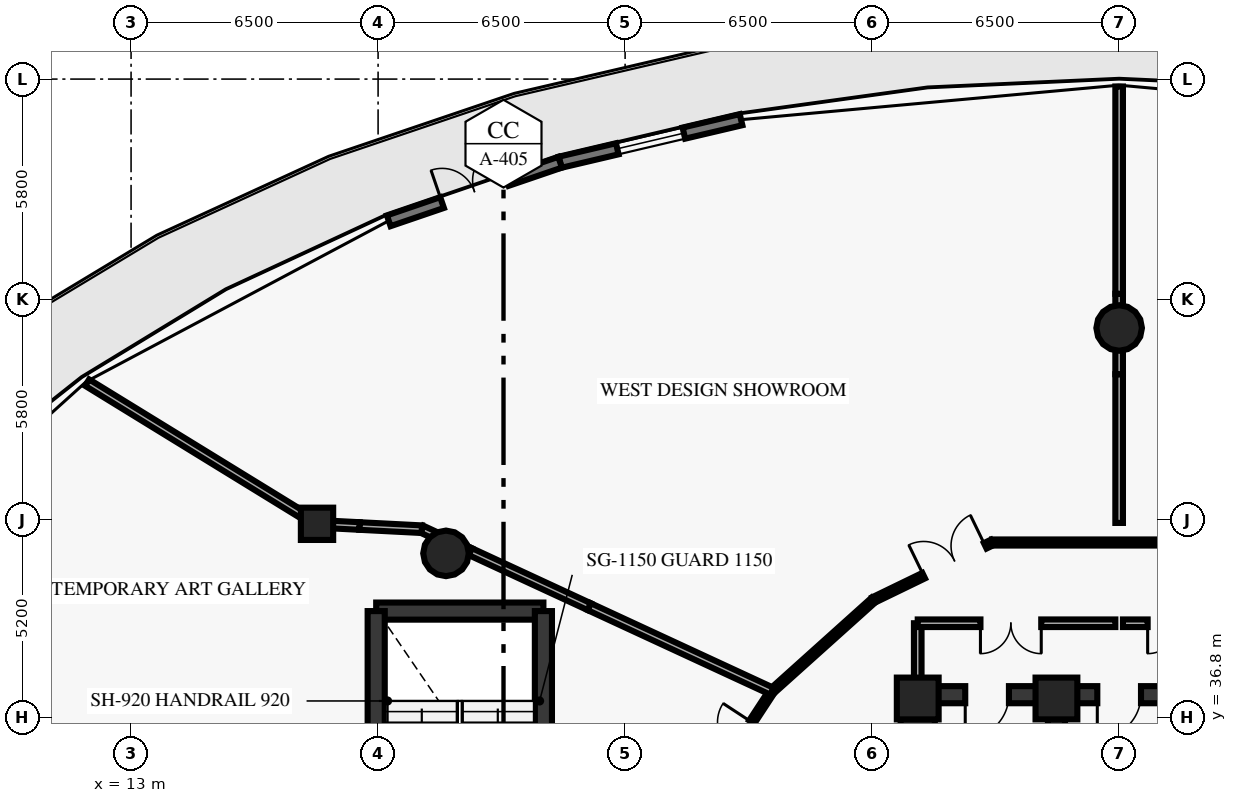
"""IFC4 building model, lengths in metres.
Left out: names, types, materials, properties, quantities, classifications, styles, units other than length and angle.
Written with IfcOpenShell. Run it as: python <this file> out.ifc"""

import sys

from ifc_helpers import new_model, si_unit, direction, frame, frame_2d, origin, origin_2d, place, context, subcontext, project, spatial, rectangle, circle, extrude, element, fill, save


model = new_model("IFC4")
c1 = context("Model", 3, precision=1e-05, world=origin(), true_north=direction((0.0, 1.0)))
c2 = subcontext(c1, "Body", "Model", "MODEL_VIEW")
j1 = project(units=[si_unit("LENGTHUNIT", "METRE"), si_unit("PLANEANGLEUNIT", "RADIAN")], contexts=[c1])
p1 = place(None, origin())
s1 = spatial("IfcSite", under=j1, at=p1, CompositionType="ELEMENT")
p2 = place(p1, origin())
s2 = spatial("IfcBuilding", under=s1, at=p2, CompositionType="ELEMENT")
p3 = place(p2, frame((0.0, 0.0, 6.0)))
s3 = spatial("IfcBuildingStorey", under=s2, at=p3, CompositionType="ELEMENT", Elevation=6.0)
for number, where, z_axis, x_axis in (
    (1, (37.35, 37.3, 0.0), (0.0, 0.0, 1.0), (1.0, 0.0, 0.0)),
    (2, (33.7, 37.3, 0.0), (0.0, 0.0, 1.0), (1.0, 0.0, 0.0)),
):
    element("IfcColumn", number, at=place(p3, frame(where, z_axis=z_axis, x_axis=x_axis)), inside=s3, PredefinedType="PILASTER", context=c2, shape_type="SweptSolid", body=[
        extrude(rectangle(XDim=1.1, YDim=1.1, at=origin_2d()), origin(), (0.0, 0.0, 1.0), 4.7),
    ])
for number, where, z_axis, x_axis in (
    (3, (39.0, 47.05, 0.0), (0.0, 0.0, 1.0), (1.0, 0.0, 0.0)),
    (4, (21.287, 41.119, 0.0), (0.0, 0.0, 1.0), (1.0, 0.0, 0.0)),
):
    element("IfcColumn", number, at=place(p3, frame(where, z_axis=z_axis, x_axis=x_axis)), inside=s3, PredefinedType="COLUMN", context=c2, shape_type="SweptSolid", body=[
        extrude(circle(Radius=0.6, at=origin_2d()), origin(), (0.0, 0.0, 1.0), 4.7),
    ])
p4 = place(p3, frame((17.893, 41.897, 0.0), z_axis=(0.0, 0.0, 1.0), x_axis=(1.0, 0.0, 0.0)))
e5 = element("IfcColumn", 5, at=p4, inside=s3, PredefinedType="COLUMN", context=c2, shape_type="SweptSolid", body=[
    extrude(rectangle(XDim=0.85, YDim=0.85, at=origin_2d()), origin(), (0.0, 0.0, 1.0), 4.7),
])
p5 = place(p3, frame((33.7, 29.05, 0.0), z_axis=(0.0, 0.0, 1.0), x_axis=(0.0, 1.0, 0.0)))
e6 = element("IfcWall", 6, at=p5, inside=s3, PredefinedType="SHEAR", context=c2, shape_type="SweptSolid", body=[
    extrude(rectangle(XDim=8.35, YDim=0.9, at=frame_2d((4.175, 0.0))), origin(), (0.0, 0.0, 1.0), 4.7),
])
p6 = place(p3, frame((24.29, 51.412, 0.0), z_axis=(0.0, 0.0, 1.0), x_axis=(0.973433532114, 0.228969776514, 0.0)))
e7 = element("IfcWall", 7, at=p6, inside=s3, PredefinedType="STANDARD", context=c2, shape_type="SweptSolid", body=[
    extrude(rectangle(XDim=4.891, YDim=0.3, at=frame_2d((2.445, 0.0))), origin(), (0.0, 0.0, 1.0), 4.7),
])
p7 = place(p6, frame((1.545, 0.0, 0.9)))
e8 = element("IfcOpeningElement", 8, at=p7, cuts=e7, PredefinedType="OPENING", context=c2, shape_type="SweptSolid", body=[
    extrude(rectangle(XDim=1.8, YDim=2.4, at=frame_2d((0.9, 1.2))), frame((0.0, 0.16, 0.0), z_axis=(0.0, -1.0, 0.0), x_axis=(1.0, 0.0, 0.0)), (0.0, 0.0, 1.0), 0.32),
])
p8 = place(p3, frame((19.78, 49.871, 0.0), z_axis=(0.0, 0.0, 1.0), x_axis=(0.946284884259, 0.323334065362, 0.0)))
e9 = element("IfcWall", 9, at=p8, inside=s3, PredefinedType="STANDARD", context=c2, shape_type="SweptSolid", body=[
    extrude(rectangle(XDim=4.766, YDim=0.3, at=frame_2d((2.383, 0.0))), origin(), (0.0, 0.0, 1.0), 4.7),
])
p9 = place(p8, frame((1.483, 0.0, 0.0)))
e10 = element("IfcOpeningElement", 10, at=p9, cuts=e9, PredefinedType="OPENING", context=c2, shape_type="SweptSolid", body=[
    extrude(rectangle(XDim=1.8, YDim=2.25, at=frame_2d((0.9, 1.125))), frame((0.0, 0.16, 0.0), z_axis=(0.0, -1.0, 0.0), x_axis=(1.0, 0.0, 0.0)), (0.0, 0.0, 1.0), 0.32),
])
p10 = place(p3, frame((37.35, 37.4, 0.0), z_axis=(0.0, 0.0, 1.0), x_axis=(-1.0, 0.0, 0.0)))
e11 = element("IfcWall", 11, at=p10, inside=s3, PredefinedType="SHEAR", context=c2, shape_type="SweptSolid", body=[
    extrude(rectangle(XDim=3.65, YDim=0.45, at=frame_2d((1.825, 0.0))), origin(), (0.0, 0.0, 1.0), 4.7),
])
p11 = place(p10, frame((1.25, 0.0, 0.0)))
e12 = element("IfcOpeningElement", 12, at=p11, cuts=e11, PredefinedType="OPENING", context=c2, shape_type="SweptSolid", body=[
    extrude(rectangle(XDim=1.15, YDim=2.15, at=frame_2d((0.575, 1.075))), frame((0.0, 0.235, 0.0), z_axis=(0.0, -1.0, 0.0), x_axis=(1.0, 0.0, 0.0)), (0.0, 0.0, 1.0), 0.47),
])
p12 = place(p3, frame((37.35, 29.05, 0.0), z_axis=(0.0, 0.0, 1.0), x_axis=(0.0, 1.0, 0.0)))
e13 = element("IfcWall", 13, at=p12, inside=s3, PredefinedType="SHEAR", context=c2, shape_type="SweptSolid", body=[
    extrude(rectangle(XDim=8.35, YDim=0.45, at=frame_2d((4.175, 0.0))), origin(), (0.0, 0.0, 1.0), 4.7),
])
p13 = place(p3, frame((40.65, 37.4, 0.0), z_axis=(0.0, 0.0, 1.0), x_axis=(-1.0, 0.0, 0.0)))
e14 = element("IfcWall", 14, at=p13, inside=s3, PredefinedType="SHEAR", context=c2, shape_type="SweptSolid", body=[
    extrude(rectangle(XDim=3.3, YDim=0.45, at=frame_2d((1.65, 0.0))), origin(), (0.0, 0.0, 1.0), 4.7),
])
p14 = place(p13, frame((1.075, 0.0, 0.0)))
e15 = element("IfcOpeningElement", 15, at=p14, cuts=e14, PredefinedType="OPENING", context=c2, shape_type="SweptSolid", body=[
    extrude(rectangle(XDim=1.15, YDim=2.15, at=frame_2d((0.575, 1.075))), frame((0.0, 0.235, 0.0), z_axis=(0.0, -1.0, 0.0), x_axis=(1.0, 0.0, 0.0)), (0.0, 0.0, 1.0), 0.47),
])
p15 = place(p3, frame((19.45, 39.6, 0.0), z_axis=(0.0, 0.0, 1.0), x_axis=(1.0, 0.0, 0.0)))
e16 = element("IfcWall", 16, at=p15, inside=s3, PredefinedType="SHEAR", context=c2, shape_type="SweptSolid", body=[
    extrude(rectangle(XDim=4.4, YDim=0.45, at=frame_2d((2.2, 0.0))), origin(), (0.0, 0.0, 1.0), 4.7),
])
for number, where, z_axis, x_axis in (
    (17, (19.45, 31.7, 0.0), (0.0, 0.0, 1.0), (0.0, 1.0, 0.0)),
    (18, (23.85, 31.7, 0.0), (0.0, 0.0, 1.0), (0.0, 1.0, 0.0)),
):
    element("IfcWall", number, at=place(p3, frame(where, z_axis=z_axis, x_axis=x_axis)), inside=s3, PredefinedType="SHEAR", context=c2, shape_type="SweptSolid", body=[
        extrude(rectangle(XDim=7.9, YDim=0.45, at=frame_2d((3.95, 0.0))), origin(), (0.0, 0.0, 1.0), 4.7),
    ])
p16 = place(p3, frame((33.7, 37.4, 0.0), z_axis=(0.0, 0.0, 1.0), x_axis=(0.0, 1.0, 0.0)))
e19 = element("IfcWall", 19, at=p16, inside=s3, PredefinedType="SOLIDWALL", context=c2, shape_type="SweptSolid", body=[
    extrude(rectangle(XDim=1.88, YDim=0.2, at=frame_2d((0.94, 0.0))), origin(), (0.0, 0.0, 1.0), 4.7),
])
p17 = place(p3, frame((38.9, 39.28, 0.0), z_axis=(0.0, 0.0, 1.0), x_axis=(-1.0, 0.0, 0.0)))
e20 = element("IfcWall", 20, at=p17, inside=s3, PredefinedType="SOLIDWALL", context=c2, shape_type="SweptSolid", body=[
    extrude(rectangle(XDim=5.2, YDim=0.2, at=frame_2d((2.6, 0.0))), origin(), (0.0, 0.0, 1.0), 4.7),
])
p18 = place(p17, frame((1.95, 0.0, 0.0)))
e21 = element("IfcOpeningElement", 21, at=p18, cuts=e20, PredefinedType="OPENING", context=c2, shape_type="SweptSolid", body=[
    extrude(rectangle(XDim=1.6, YDim=2.2, at=frame_2d((0.8, 1.1))), frame((0.0, 0.11, 0.0), z_axis=(0.0, -1.0, 0.0), x_axis=(1.0, 0.0, 0.0)), (0.0, 0.0, 1.0), 0.22),
])
p19 = place(p3, frame((45.7, 39.28, 0.0), z_axis=(0.0, 0.0, 1.0), x_axis=(-1.0, 0.0, 0.0)))
e22 = element("IfcWall", 22, at=p19, inside=s3, PredefinedType="SOLIDWALL", context=c2, shape_type="SweptSolid", body=[
    extrude(rectangle(XDim=6.6, YDim=0.2, at=frame_2d((3.3, 0.0))), origin(), (0.0, 0.0, 1.0), 4.7),
])
p20 = place(p19, frame((4.35, 0.0, 0.0)))
e23 = element("IfcOpeningElement", 23, at=p20, cuts=e22, PredefinedType="OPENING", context=c2, shape_type="SweptSolid", body=[
    extrude(rectangle(XDim=1.6, YDim=2.2, at=frame_2d((0.8, 1.1))), frame((0.0, 0.11, 0.0), z_axis=(0.0, -1.0, 0.0), x_axis=(1.0, 0.0, 0.0)), (0.0, 0.0, 1.0), 0.22),
])
p21 = place(p3, frame((42.344, 41.405, 0.0), z_axis=(0.0, 0.0, 1.0), x_axis=(-1.0, 0.0, 0.0)))
e24 = element("IfcWall", 24, at=p21, inside=s3, PredefinedType="PARTITIONING", context=c2, shape_type="SweptSolid", body=[
    extrude(rectangle(XDim=6.688, YDim=0.16, at=frame_2d((3.344, 0.0))), origin(), (0.0, 0.0, 1.0), 4.7),
])
p22 = place(p3, frame((32.54, 39.894, 0.0), z_axis=(0.0, 0.0, 1.0), x_axis=(0.899789784655, 0.436323668199, 0.0)))
e25 = element("IfcWall", 25, at=p22, inside=s3, PredefinedType="PARTITIONING", context=c2, shape_type="SweptSolid", body=[
    extrude(rectangle(XDim=3.463, YDim=0.16, at=frame_2d((1.731, 0.0))), origin(), (0.0, 0.0, 1.0), 4.7),
])
p23 = place(p22, frame((1.463, 0.0, 0.0)))
e26 = element("IfcOpeningElement", 26, at=p23, cuts=e25, PredefinedType="OPENING", context=c2, shape_type="SweptSolid", body=[
    extrude(rectangle(XDim=1.8, YDim=2.3, at=frame_2d((0.9, 1.15))), frame((0.0, 0.09, 0.0), z_axis=(0.0, -1.0, 0.0), x_axis=(1.0, 0.0, 0.0)), (0.0, 0.0, 1.0), 0.18),
])
p24 = place(p3, frame((32.54, 39.894, 0.0), z_axis=(0.0, 0.0, 1.0), x_axis=(-0.744032872127, -0.668143012531, 0.0)))
e27 = element("IfcWall", 27, at=p24, inside=s3, PredefinedType="PARTITIONING", context=c2, shape_type="SweptSolid", body=[
    extrude(rectangle(XDim=3.597, YDim=0.16, at=frame_2d((1.798, 0.0))), origin(), (0.0, 0.0, 1.0), 4.7),
])
p25 = place(p3, frame((27.811, 34.36, 0.0), z_axis=(0.0, 0.0, 1.0), x_axis=(0.548348738977, 0.836249759619, 0.0)))
e28 = element("IfcWall", 28, at=p25, inside=s3, PredefinedType="PARTITIONING", context=c2, shape_type="SweptSolid", body=[
    extrude(rectangle(XDim=3.744, YDim=0.16, at=frame_2d((1.872, 0.0))), origin(), (0.0, 0.0, 1.0), 4.7),
])
p26 = place(p25, frame((0.972, 0.0, 0.0)))
e29 = element("IfcOpeningElement", 29, at=p26, cuts=e28, PredefinedType="OPENING", context=c2, shape_type="SweptSolid", body=[
    extrude(rectangle(XDim=1.8, YDim=2.3, at=frame_2d((0.9, 1.15))), frame((0.0, 0.09, 0.0), z_axis=(0.0, -1.0, 0.0), x_axis=(1.0, 0.0, 0.0)), (0.0, 0.0, 1.0), 0.18),
])
p27 = place(p3, frame((39.0, 41.92, 0.0), z_axis=(0.0, 0.0, 1.0), x_axis=(0.0, 1.0, 0.0)))
e30 = element("IfcWall", 30, at=p27, inside=s3, PredefinedType="PARTITIONING", context=c2, shape_type="SweptSolid", body=[
    extrude(rectangle(XDim=3.913, YDim=0.2, at=frame_2d((1.957, 0.0))), origin(), (0.0, 0.0, 1.0), 4.7),
])
p28 = place(p3, frame((39.0, 45.833, 0.0), z_axis=(0.0, 0.0, 1.0), x_axis=(0.0, 1.0, 0.0)))
e31 = element("IfcWall", 31, at=p28, inside=s3, PredefinedType="PARTITIONING", context=c2, shape_type="SweptSolid", body=[
    extrude(rectangle(XDim=1.234, YDim=0.2, at=frame_2d((0.617, 0.0))), origin(), (0.0, 0.0, 1.0), 4.165),
])
p29 = place(p3, frame((39.0, 47.067, 0.0), z_axis=(0.0, 0.0, 1.0), x_axis=(0.0, 1.0, 0.0)))
e32 = element("IfcWall", 32, at=p29, inside=s3, PredefinedType="PARTITIONING", context=c2, shape_type="SweptSolid", body=[
    extrude(rectangle(XDim=0.883, YDim=0.2, at=frame_2d((0.441, 0.0))), origin(), (0.0, 0.0, 1.0), 4.7),
])
p30 = place(p3, frame((39.0, 47.95, 0.0), z_axis=(0.0, 0.0, 1.0), x_axis=(0.0, 1.0, 0.0)))
e33 = element("IfcWall", 33, at=p30, inside=s3, PredefinedType="PARTITIONING", context=c2, shape_type="SweptSolid", body=[
    extrude(rectangle(XDim=5.455, YDim=0.2, at=frame_2d((2.728, 0.0))), origin(), (0.0, 0.0, 1.0), 4.7),
])
p31 = place(p3, frame((29.864, 37.491, 0.0), z_axis=(0.0, 0.0, 1.0), x_axis=(-0.907524785669, 0.419998527851, 0.0)))
e34 = element("IfcWall", 34, at=p31, inside=s3, PredefinedType="PARTITIONING", context=c2, shape_type="SweptSolid", body=[
    extrude(rectangle(XDim=5.3, YDim=0.2, at=frame_2d((2.65, 0.0))), origin(), (0.0, 0.0, 1.0), 4.7),
])
p32 = place(p3, frame((25.054, 39.717, 0.0), z_axis=(0.0, 0.0, 1.0), x_axis=(-0.90747190463, 0.420112773321, 0.0)))
e35 = element("IfcWall", 35, at=p32, inside=s3, PredefinedType="PARTITIONING", context=c2, shape_type="SweptSolid", body=[
    extrude(rectangle(XDim=3.449, YDim=0.2, at=frame_2d((1.725, 0.0))), origin(), (0.0, 0.0, 1.0), 3.92),
])
p33 = place(p3, frame((21.924, 41.166, 0.0), z_axis=(0.0, 0.0, 1.0), x_axis=(-0.907622896373, 0.419786467124, 0.0)))
e36 = element("IfcWall", 36, at=p33, inside=s3, PredefinedType="PARTITIONING", context=c2, shape_type="SweptSolid", body=[
    extrude(rectangle(XDim=1.403, YDim=0.2, at=frame_2d((0.701, 0.0))), origin(), (0.0, 0.0, 1.0), 4.7),
])
p34 = place(p3, frame((20.651, 41.755, 0.0), z_axis=(0.0, 0.0, 1.0), x_axis=(-0.998685128887, 0.051264152576, 0.0)))
e37 = element("IfcWall", 37, at=p34, inside=s3, PredefinedType="PARTITIONING", context=c2, shape_type="SweptSolid", body=[
    extrude(rectangle(XDim=1.643, YDim=0.2, at=frame_2d((0.822, 0.0))), origin(), (0.0, 0.0, 1.0), 4.7),
])
p35 = place(p3, frame((19.01, 41.839, 0.0), z_axis=(0.0, 0.0, 1.0), x_axis=(-0.998660904733, 0.051733909163, 0.0)))
e38 = element("IfcWall", 38, at=p35, inside=s3, PredefinedType="PARTITIONING", context=c2, shape_type="SweptSolid", body=[
    extrude(rectangle(XDim=1.118, YDim=0.2, at=frame_2d((0.559, 0.0))), origin(), (0.0, 0.0, 1.0), 4.24),
])
p36 = place(p3, frame((17.893, 41.897, 0.0), z_axis=(0.0, 0.0, 1.0), x_axis=(-0.85206305886, 0.523439149974, 0.0)))
e39 = element("IfcWall", 39, at=p36, inside=s3, PredefinedType="PARTITIONING", context=c2, shape_type="SweptSolid", body=[
    extrude(rectangle(XDim=7.099, YDim=0.2, at=frame_2d((3.55, 0.0))), origin(), (0.0, 0.0, 1.0), 4.7),
])
p37 = place(p7, origin())
e40 = element("IfcWindow", 40, at=p37, inside=s3, PartitioningType="DOUBLE_PANEL_VERTICAL", PredefinedType="WINDOW", context=c2, shape_type="SweptSolid", body=[
    extrude(rectangle(XDim=1.8, YDim=2.4, at=frame_2d((0.9, 1.2))), frame((0.0, 0.03, 0.0), z_axis=(0.0, -1.0, 0.0), x_axis=(1.0, 0.0, 0.0)), (0.0, 0.0, 1.0), 0.06),
])
fill(e8, e40)
p38 = place(p9, origin())
e41 = element("IfcDoor", 41, at=p38, inside=s3, OperationType="DOUBLE_DOOR_SINGLE_SWING", PredefinedType="DOOR", context=c2, shape_type="SweptSolid", body=[
    extrude(rectangle(XDim=1.8, YDim=2.25, at=frame_2d((0.9, 1.125))), frame((0.0, 0.025, 0.0), z_axis=(0.0, -1.0, 0.0), x_axis=(1.0, 0.0, 0.0)), (0.0, 0.0, 1.0), 0.05),
])
fill(e10, e41)
p39 = place(p11, origin())
e42 = element("IfcDoor", 42, at=p39, inside=s3, OperationType="SINGLE_SWING_RIGHT", PredefinedType="DOOR", context=c2, shape_type="SweptSolid", body=[
    extrude(rectangle(XDim=1.15, YDim=2.15, at=frame_2d((0.575, 1.075))), frame((0.0, 0.025, 0.0), z_axis=(0.0, -1.0, 0.0), x_axis=(1.0, 0.0, 0.0)), (0.0, 0.0, 1.0), 0.05),
])
fill(e12, e42)
p40 = place(p14, origin())
e43 = element("IfcDoor", 43, at=p40, inside=s3, OperationType="SINGLE_SWING_RIGHT", PredefinedType="DOOR", context=c2, shape_type="SweptSolid", body=[
    extrude(rectangle(XDim=1.15, YDim=2.15, at=frame_2d((0.575, 1.075))), frame((0.0, 0.025, 0.0), z_axis=(0.0, -1.0, 0.0), x_axis=(1.0, 0.0, 0.0)), (0.0, 0.0, 1.0), 0.05),
])
fill(e15, e43)
p41 = place(p18, origin())
e44 = element("IfcDoor", 44, at=p41, inside=s3, OperationType="DOUBLE_DOOR_SINGLE_SWING", PredefinedType="DOOR", context=c2, shape_type="SweptSolid", body=[
    extrude(rectangle(XDim=1.6, YDim=2.2, at=frame_2d((0.8, 1.1))), frame((0.0, 0.025, 0.0), z_axis=(0.0, -1.0, 0.0), x_axis=(1.0, 0.0, 0.0)), (0.0, 0.0, 1.0), 0.05),
])
fill(e21, e44)
p42 = place(p20, origin())
e45 = element("IfcDoor", 45, at=p42, inside=s3, OperationType="DOUBLE_DOOR_SINGLE_SWING", PredefinedType="DOOR", context=c2, shape_type="SweptSolid", body=[
    extrude(rectangle(XDim=1.6, YDim=2.2, at=frame_2d((0.8, 1.1))), frame((0.0, 0.025, 0.0), z_axis=(0.0, -1.0, 0.0), x_axis=(1.0, 0.0, 0.0)), (0.0, 0.0, 1.0), 0.05),
])
fill(e23, e45)
p43 = place(p23, origin())
e46 = element("IfcDoor", 46, at=p43, inside=s3, OperationType="DOUBLE_DOOR_SINGLE_SWING", PredefinedType="DOOR", context=c2, shape_type="SweptSolid", body=[
    extrude(rectangle(XDim=1.8, YDim=2.3, at=frame_2d((0.9, 1.15))), frame((0.0, 0.025, 0.0), z_axis=(0.0, -1.0, 0.0), x_axis=(1.0, 0.0, 0.0)), (0.0, 0.0, 1.0), 0.05),
])
fill(e26, e46)
p44 = place(p26, origin())
e47 = element("IfcDoor", 47, at=p44, inside=s3, OperationType="DOUBLE_DOOR_SINGLE_SWING", PredefinedType="DOOR", context=c2, shape_type="SweptSolid", body=[
    extrude(rectangle(XDim=1.8, YDim=2.3, at=frame_2d((0.9, 1.15))), frame((0.0, 0.025, 0.0), z_axis=(0.0, -1.0, 0.0), x_axis=(1.0, 0.0, 0.0)), (0.0, 0.0, 1.0), 0.05),
])
fill(e29, e47)
save(model, sys.argv[1])
